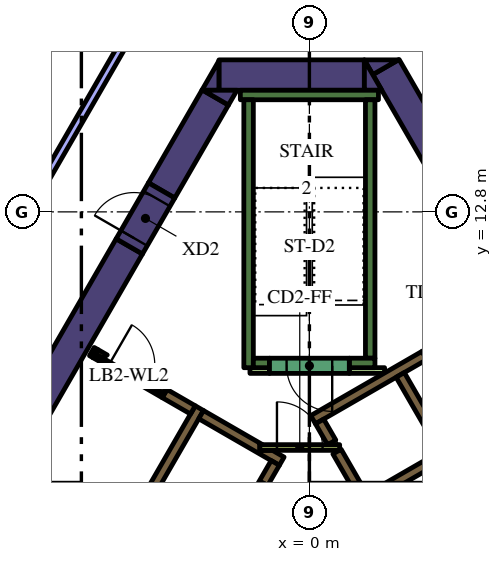
"""IFC4 building model, lengths in metres.
Left out: names, types, materials, properties, quantities, classifications, styles, units other than length and angle.
Written with IfcOpenShell. Run it as: python <this file> out.ifc"""

import sys

from ifc_helpers import new_model, si_unit, direction, frame, frame_2d, origin, place, context, subcontext, project, spatial, polyline, rectangle, outline, extrude, element, fill, save


model = new_model("IFC4")
c1 = context("Model", 3, precision=1e-05, world=origin(), true_north=direction((0.0, 1.0)))
c2 = subcontext(c1, "Body", "Model", "MODEL_VIEW")
j1 = project(units=[si_unit("LENGTHUNIT", "METRE"), si_unit("PLANEANGLEUNIT", "RADIAN")], contexts=[c1])
p1 = place(None, origin())
s1 = spatial("IfcSite", under=j1, at=p1, CompositionType="ELEMENT")
p2 = place(p1, origin())
s2 = spatial("IfcBuilding", under=s1, at=p2, CompositionType="ELEMENT")
p3 = place(p2, frame((0.0, 0.0, 145.8)))
s3 = spatial("IfcBuildingStorey", under=s2, at=p3, CompositionType="ELEMENT", Elevation=145.8)
p4 = place(p3, frame((5.209, 11.078, 0.0), z_axis=(0.0, 0.0, 1.0), x_axis=(-0.500035624827, 0.866004834804, 0.0)))
e1 = element("IfcWall", 1, at=p4, inside=s3, PredefinedType="SOLIDWALL", context=c2, shape_type="SweptSolid", body=[
    extrude(rectangle(XDim=6.388, YDim=0.8, at=frame_2d((3.194, 0.0))), origin(), (0.0, 0.0, 1.0), 4.2),
])
p5 = place(p3, origin())
e2 = element("IfcWall", 2, at=p5, inside=s3, PredefinedType="SOLIDWALL", context=c2, shape_type="SweptSolid", body=[
    extrude(outline(polyline([(1.443, 16.8), (2.339, 16.8), (1.667, 16.412), (1.443, 16.8)])), origin(), (0.0, 0.0, 1.0), 4.2),
])
p6 = place(p3, frame((-2.379, 16.4, 0.0), z_axis=(0.0, 0.0, 1.0), x_axis=(1.0, 0.0, 0.0)))
e3 = element("IfcWall", 3, at=p6, inside=s3, PredefinedType="SOLIDWALL", context=c2, shape_type="SweptSolid", body=[
    extrude(rectangle(XDim=3.824, YDim=0.8, at=frame_2d((1.912, 0.0))), origin(), (0.0, 0.0, 1.0), 4.2),
])
e4 = element("IfcWall", 4, at=p5, inside=s3, PredefinedType="SOLIDWALL", context=c2, shape_type="SweptSolid", body=[
    extrude(outline(polyline([(1.905, 16.0), (1.447, 16.0), (1.447, 16.793), (1.905, 16.0)])), origin(), (0.0, 0.0, 1.0), 4.2),
])
e5 = element("IfcWall", 5, at=p5, inside=s3, PredefinedType="SOLIDWALL", context=c2, shape_type="SweptSolid", body=[
    extrude(outline(polyline([(-2.829, 16.0), (-2.381, 16.776), (-2.381, 16.0), (-2.829, 16.0)])), origin(), (0.0, 0.0, 1.0), 4.2),
])
p7 = place(p3, frame((-2.477, 15.81, 0.0), z_axis=(0.0, 0.0, 1.0), x_axis=(-0.499969377405, -0.866043083026, 0.0)))
e6 = element("IfcWall", 6, at=p7, inside=s3, PredefinedType="SOLIDWALL", context=c2, shape_type="SweptSolid", body=[
    extrude(rectangle(XDim=2.824, YDim=0.8, at=frame_2d((1.412, 0.0))), origin(), (0.0, 0.0, 1.0), 4.2),
])
e7 = element("IfcWall", 7, at=p5, inside=s3, PredefinedType="SOLIDWALL", context=c2, shape_type="SweptSolid", body=[
    extrude(outline(polyline([(-1.905, 16.0), (-2.129, 15.612), (-2.801, 16.0), (-1.905, 16.0)])), origin(), (0.0, 0.0, 1.0), 4.2),
])
p8 = place(p3, frame((-12.668, -1.842, 0.0), z_axis=(0.0, 0.0, 1.0), x_axis=(0.500003640647, 0.866023301845, 0.0)))
e8 = element("IfcWall", 8, at=p8, inside=s3, PredefinedType="SOLIDWALL", context=c2, shape_type="SweptSolid", body=[
    extrude(rectangle(XDim=15.858, YDim=0.8, at=frame_2d((7.929, 0.0))), origin(), (0.0, 0.0, 1.0), 4.2),
])
p9 = place(p3, frame((-1.817, 15.875, 0.0), z_axis=(0.0, 0.0, 1.0), x_axis=(1.0, 0.0, 0.0)))
e9 = element("IfcWall", 9, at=p9, inside=s3, PredefinedType="SOLIDWALL", context=c2, shape_type="SweptSolid", body=[
    extrude(rectangle(XDim=3.634, YDim=0.25, at=frame_2d((1.817, 0.0))), origin(), (0.0, 0.0, 1.0), 4.2),
])
p10 = place(p3, frame((1.6, 8.95, 0.0), z_axis=(0.0, 0.0, 1.0), x_axis=(0.0, 1.0, 0.0)))
e10 = element("IfcWall", 10, at=p10, inside=s3, PredefinedType="SOLIDWALL", context=c2, shape_type="SweptSolid", body=[
    extrude(rectangle(XDim=6.8, YDim=0.25, at=frame_2d((3.4, 0.0))), origin(), (0.0, 0.0, 1.0), 4.2),
])
p11 = place(p3, frame((1.05, 8.825, 0.0), z_axis=(0.0, 0.0, 1.0), x_axis=(1.0, 0.0, 0.0)))
e11 = element("IfcWall", 11, at=p11, inside=s3, PredefinedType="SOLIDWALL", context=c2, shape_type="SweptSolid", body=[
    extrude(rectangle(XDim=0.675, YDim=0.25, at=frame_2d((0.337, 0.0))), origin(), (0.0, 0.0, 1.0), 4.2),
])
p12 = place(p3, frame((-1.6, 8.7, 0.0), z_axis=(0.0, 0.0, 1.0), x_axis=(0.0, 1.0, 0.0)))
e12 = element("IfcWall", 12, at=p12, inside=s3, PredefinedType="SOLIDWALL", context=c2, shape_type="SweptSolid", body=[
    extrude(rectangle(XDim=7.05, YDim=0.25, at=frame_2d((3.525, 0.0))), origin(), (0.0, 0.0, 1.0), 4.2),
])
p13 = place(p3, frame((-1.475, 8.825, 0.0), z_axis=(0.0, 0.0, 1.0), x_axis=(1.0, 0.0, 0.0)))
e13 = element("IfcWall", 13, at=p13, inside=s3, PredefinedType="SOLIDWALL", context=c2, shape_type="SweptSolid", body=[
    extrude(rectangle(XDim=0.425, YDim=0.25, at=frame_2d((0.212, 0.0))), origin(), (0.0, 0.0, 1.0), 4.2),
])
p14 = place(p3, frame((3.028, 9.023, 0.0), z_axis=(0.0, 0.0, 1.0), x_axis=(-0.866036587186, -0.49998062928, 0.0)))
e14 = element("IfcWall", 14, at=p14, inside=s3, PredefinedType="SOLIDWALL", context=c2, shape_type="SweptSolid", body=[
    extrude(rectangle(XDim=3.384, YDim=0.25, at=frame_2d((1.692, 0.0))), origin(), (0.0, 0.0, 1.0), 4.2),
])
p15 = place(p3, frame((0.268, 7.285, 0.0), z_axis=(0.0, 0.0, 1.0), x_axis=(0.500098681536, -0.865968422476, 0.0)))
e15 = element("IfcWall", 15, at=p15, inside=s3, PredefinedType="SOLIDWALL", context=c2, shape_type="SweptSolid", body=[
    extrude(rectangle(XDim=0.636, YDim=0.25, at=frame_2d((0.318, 0.0))), origin(), (0.0, 0.0, 1.0), 4.2),
])
p16 = place(p3, frame((5.97, -2.591, 0.0), z_axis=(0.0, 0.0, 1.0), x_axis=(-0.499994469932, 0.866028596547, 0.0)))
e16 = element("IfcWall", 16, at=p16, inside=s3, PredefinedType="SOLIDWALL", context=c2, shape_type="SweptSolid", body=[
    extrude(rectangle(XDim=10.488, YDim=0.25, at=frame_2d((5.244, 0.0))), origin(), (0.0, 0.0, 1.0), 4.2),
])
p17 = place(p3, frame((1.574, 5.274, 0.0), z_axis=(0.0, 0.0, 1.0), x_axis=(0.866028486751, 0.499994660107, 0.0)))
e17 = element("IfcWall", 17, at=p17, inside=s3, PredefinedType="SOLIDWALL", context=c2, shape_type="SweptSolid", body=[
    extrude(rectangle(XDim=2.2, YDim=0.25, at=frame_2d((1.1, 0.0))), origin(), (0.0, 0.0, 1.0), 4.2),
])
p18 = place(p3, frame((-8.06, -1.311, 0.0), z_axis=(0.0, 0.0, 1.0), x_axis=(0.50000273126, 0.866023826885, 0.0)))
e18 = element("IfcWall", 18, at=p18, inside=s3, PredefinedType="SOLIDWALL", context=c2, shape_type="SweptSolid", body=[
    extrude(rectangle(XDim=10.33, YDim=0.25, at=frame_2d((5.165, 0.0))), origin(), (0.0, 0.0, 1.0), 4.2),
])
e19 = element("IfcWall", 19, at=p5, inside=s3, PredefinedType="SOLIDWALL", context=c2, shape_type="SweptSolid", body=[
    extrude(outline(polyline([(-2.912, 7.356), (-2.787, 7.573), (-1.232, 6.675), (-1.303, 6.675), (-1.304, 6.675), (-1.304, 6.675), (-1.304, 6.525), (-1.304, 6.525), (-1.303, 6.525), (-0.971, 6.525), (-0.665, 6.348), (-0.79, 6.132), (-1.007, 6.257), (-1.007, 6.257), (-2.912, 7.356)])), origin(), (0.0, 0.0, 1.0), 4.2),
])
p19 = place(p3, frame((-5.725, 9.125, 0.0), z_axis=(0.0, 0.0, 1.0), x_axis=(0.866185586049, -0.49972245349, 0.0)))
e20 = element("IfcWall", 20, at=p19, inside=s3, PredefinedType="SOLIDWALL", context=c2, shape_type="SweptSolid", body=[
    extrude(rectangle(XDim=0.11, YDim=0.25, at=frame_2d((0.055, 0.0))), origin(), (0.0, 0.0, 1.0), 4.2),
])
p20 = place(p3, frame((-3.066, 7.59, 0.0), z_axis=(0.0, 0.0, 1.0), x_axis=(-0.866081358704, 0.49990307071, 0.0)))
e21 = element("IfcWall", 21, at=p20, inside=s3, PredefinedType="SOLIDWALL", context=c2, shape_type="SweptSolid", body=[
    extrude(rectangle(XDim=0.858, YDim=0.25, at=frame_2d((0.429, 0.0))), origin(), (0.0, 0.0, 1.0), 4.2),
])
e22 = element("IfcWall", 22, at=p5, inside=s3, PredefinedType="SOLIDWALL", context=c2, shape_type="SweptSolid", body=[
    extrude(outline(polyline([(-3.748, 8.128), (-3.813, 8.015), (-4.027, 8.139), (-4.017, 8.156), (-4.008, 8.173), (-4.0, 8.192), (-3.995, 8.21), (-3.991, 8.23), (-3.99, 8.25), (-3.99, 8.268), (-3.748, 8.128)])), origin(), (0.0, 0.0, 1.0), 4.2),
])
e23 = element("IfcWall", 23, at=p5, inside=s3, PredefinedType="SOLIDWALL", context=c2, shape_type="SweptSolid", body=[
    extrude(outline(polyline([(-5.689, 8.96), (-5.69, 8.961), (-5.565, 9.177), (-5.319, 9.035), (-5.335, 9.026), (-5.351, 9.015), (-5.366, 9.002), (-5.379, 8.988), (-5.392, 8.972), (-5.402, 8.956), (-5.412, 8.939), (-5.629, 9.064), (-5.629, 9.064), (-5.689, 8.96)])), origin(), (0.0, 0.0, 1.0), 4.2),
])
p21 = place(p3, frame((1.05, 8.625, 0.0), z_axis=(0.0, 0.0, 1.0), x_axis=(1.0, 0.0, 0.0)))
e24 = element("IfcWall", 24, at=p21, inside=s3, PredefinedType="PARTITIONING", context=c2, shape_type="SweptSolid", body=[
    extrude(rectangle(XDim=0.929, YDim=0.15, at=frame_2d((0.464, 0.0))), origin(), (0.0, 0.0, 1.0), 3.15),
])
p22 = place(p3, frame((-1.564, 8.625, 0.0), z_axis=(0.0, 0.0, 1.0), x_axis=(1.0, 0.0, 0.0)))
e25 = element("IfcWall", 25, at=p22, inside=s3, PredefinedType="PARTITIONING", context=c2, shape_type="SweptSolid", body=[
    extrude(rectangle(XDim=0.514, YDim=0.15, at=frame_2d((0.257, 0.0))), origin(), (0.0, 0.0, 1.0), 3.15),
])
p23 = place(p3, frame((8.565, -2.185, 0.0), z_axis=(0.0, 0.0, 1.0), x_axis=(-0.499997954832, 0.866026584559, 0.0)))
e26 = element("IfcWall", 26, at=p23, inside=s3, PredefinedType="SOLIDWALL", context=c2, shape_type="SweptSolid", body=[
    extrude(rectangle(XDim=12.35, YDim=0.25, at=frame_2d((6.175, 0.0))), origin(), (0.0, 0.0, 1.0), 4.2),
])
p24 = place(p23, frame((0.585, 0.0, 0.0)))
e27 = element("IfcOpeningElement", 27, at=p24, cuts=e26, PredefinedType="OPENING", context=c2, shape_type="SweptSolid", body=[
    extrude(rectangle(XDim=1.1, YDim=2.1, at=frame_2d((0.55, 1.05))), frame((0.0, 0.135, 0.0), z_axis=(0.0, -1.0, 0.0), x_axis=(1.0, 0.0, 0.0)), (0.0, 0.0, 1.0), 0.27),
])
p25 = place(p3, frame((-0.898, 6.194, 0.0), z_axis=(0.0, 0.0, 1.0), x_axis=(-0.499996202215, -0.866027596426, 0.0)))
e28 = element("IfcWall", 28, at=p25, inside=s3, PredefinedType="SOLIDWALL", context=c2, shape_type="SweptSolid", body=[
    extrude(rectangle(XDim=9.83, YDim=0.25, at=frame_2d((4.915, 0.0))), origin(), (0.0, 0.0, 1.0), 4.2),
])
p26 = place(p25, frame((0.585, 0.0, 0.0)))
e29 = element("IfcOpeningElement", 29, at=p26, cuts=e28, PredefinedType="OPENING", context=c2, shape_type="SweptSolid", body=[
    extrude(rectangle(XDim=1.1, YDim=2.1, at=frame_2d((0.55, 1.05))), frame((0.0, 0.135, 0.0), z_axis=(0.0, -1.0, 0.0), x_axis=(1.0, 0.0, 0.0)), (0.0, 0.0, 1.0), 0.27),
])
p27 = place(p25, frame((3.105, 0.0, 0.0)))
e30 = element("IfcOpeningElement", 30, at=p27, cuts=e28, PredefinedType="OPENING", context=c2, shape_type="SweptSolid", body=[
    extrude(rectangle(XDim=1.1, YDim=2.1, at=frame_2d((0.55, 1.05))), frame((0.0, 0.135, 0.0), z_axis=(0.0, -1.0, 0.0), x_axis=(1.0, 0.0, 0.0)), (0.0, 0.0, 1.0), 0.27),
])
p28 = place(p25, frame((5.625, 0.0, 0.0)))
e31 = element("IfcOpeningElement", 31, at=p28, cuts=e28, PredefinedType="OPENING", context=c2, shape_type="SweptSolid", body=[
    extrude(rectangle(XDim=1.1, YDim=2.1, at=frame_2d((0.55, 1.05))), frame((0.0, 0.135, 0.0), z_axis=(0.0, -1.0, 0.0), x_axis=(1.0, 0.0, 0.0)), (0.0, 0.0, 1.0), 0.27),
])
p29 = place(p25, frame((8.145, 0.0, 0.0)))
e32 = element("IfcOpeningElement", 32, at=p29, cuts=e28, PredefinedType="OPENING", context=c2, shape_type="SweptSolid", body=[
    extrude(rectangle(XDim=1.1, YDim=2.1, at=frame_2d((0.55, 1.05))), frame((0.0, 0.135, 0.0), z_axis=(0.0, -1.0, 0.0), x_axis=(1.0, 0.0, 0.0)), (0.0, 0.0, 1.0), 0.27),
])
p30 = place(p3, frame((1.05, 8.75, 0.0), z_axis=(0.0, 0.0, 1.0), x_axis=(-1.0, 0.0, 0.0)))
e33 = element("IfcWall", 33, at=p30, inside=s3, PredefinedType="SOLIDWALL", context=c2, shape_type="SweptSolid", body=[
    extrude(rectangle(XDim=2.1, YDim=0.4, at=frame_2d((1.05, 0.0))), origin(), (0.0, 0.0, 1.0), 4.2),
])
p31 = place(p30, frame((0.45, 0.0, 0.0)))
e34 = element("IfcOpeningElement", 34, at=p31, cuts=e33, PredefinedType="OPENING", context=c2, shape_type="SweptSolid", body=[
    extrude(rectangle(XDim=1.2, YDim=2.1, at=frame_2d((0.6, 1.05))), frame((0.0, 0.21, 0.0), z_axis=(0.0, -1.0, 0.0), x_axis=(1.0, 0.0, 0.0)), (0.0, 0.0, 1.0), 0.42),
])
p32 = place(p3, frame((-1.303, 6.6, 0.0), z_axis=(0.0, 0.0, 1.0), x_axis=(1.0, 0.0, 0.0)))
e35 = element("IfcWall", 35, at=p32, inside=s3, PredefinedType="PARTITIONING", context=c2, shape_type="SweptSolid", body=[
    extrude(rectangle(XDim=2.1, YDim=0.15, at=frame_2d((1.05, 0.0))), origin(), (0.0, 0.0, 1.0), 4.2),
])
p33 = place(p32, frame((0.45, 0.0, 0.0)))
e36 = element("IfcOpeningElement", 36, at=p33, cuts=e35, PredefinedType="OPENING", context=c2, shape_type="SweptSolid", body=[
    extrude(rectangle(XDim=1.2, YDim=2.1, at=frame_2d((0.6, 1.05))), frame((0.0, 0.085, 0.0), z_axis=(0.0, -1.0, 0.0), x_axis=(1.0, 0.0, 0.0)), (0.0, 0.0, 1.0), 0.17),
])
p34 = place(p3, frame((-5.659, 9.012, 0.0), z_axis=(0.0, 0.0, 1.0), x_axis=(0.866009402589, -0.500027713859, 0.0)))
e37 = element("IfcWall", 37, at=p34, inside=s3, PredefinedType="PARTITIONING", context=c2, shape_type="SweptSolid", body=[
    extrude(rectangle(XDim=2.1, YDim=0.12, at=frame_2d((1.05, 0.0))), origin(), (0.0, 0.0, 1.0), 3.15),
])
p35 = place(p34, frame((0.45, 0.0, 0.0)))
e38 = element("IfcOpeningElement", 38, at=p35, cuts=e37, PredefinedType="OPENING", context=c2, shape_type="SweptSolid", body=[
    extrude(rectangle(XDim=1.2, YDim=2.1, at=frame_2d((0.6, 1.05))), frame((0.0, 0.07, 0.0), z_axis=(0.0, -1.0, 0.0), x_axis=(1.0, 0.0, 0.0)), (0.0, 0.0, 1.0), 0.14),
])
p36 = place(p3, frame((-4.739, 11.892, 0.0), z_axis=(0.0, 0.0, 1.0), x_axis=(0.500062241894, 0.865989465428, 0.0)))
e39 = element("IfcWall", 39, at=p36, inside=s3, PredefinedType="SOLIDWALL", context=c2, shape_type="SweptSolid", body=[
    extrude(rectangle(XDim=1.7, YDim=0.8, at=frame_2d((0.85, 0.0))), origin(), (0.0, 0.0, 1.0), 4.2),
])
p37 = place(p36, frame((0.25, 0.0, 0.0)))
e40 = element("IfcOpeningElement", 40, at=p37, cuts=e39, PredefinedType="OPENING", context=c2, shape_type="SweptSolid", body=[
    extrude(rectangle(XDim=1.2, YDim=2.1, at=frame_2d((0.6, 1.05))), frame((0.0, 0.41, 0.0), z_axis=(0.0, -1.0, 0.0), x_axis=(1.0, 0.0, 0.0)), (0.0, 0.0, 1.0), 0.82),
])
p38 = place(p3, frame((-6.658, 20.96, 0.0), z_axis=(0.0, 0.0, 1.0), x_axis=(-0.551907039463, -0.833905642019, 0.0)))
e41 = element("IfcWall", 41, at=p38, inside=s3, PredefinedType="PARTITIONING", context=c2, shape_type="SweptSolid", body=[
    extrude(rectangle(XDim=5.412, YDim=0.15, at=frame_2d((2.706, 0.0))), origin(), (0.0, 0.0, 1.0), 3.15),
])
p39 = place(p3, frame((-4.167, 18.483, 0.0), z_axis=(0.0, 0.0, 1.0), x_axis=(-0.499974340325, -0.866040217898, 0.0)))
e42 = element("IfcWall", 42, at=p39, inside=s3, PredefinedType="PARTITIONING", context=c2, shape_type="SweptSolid", body=[
    extrude(rectangle(XDim=8.894, YDim=0.2, at=frame_2d((4.447, 0.0))), origin(), (0.0, 0.0, 1.0), 3.15),
])
p40 = place(p26, origin())
e43 = element("IfcDoor", 43, at=p40, inside=s3, OperationType="DOUBLE_DOOR_SLIDING", PredefinedType="DOOR", context=c2, shape_type="SweptSolid", body=[
    extrude(rectangle(XDim=1.1, YDim=2.1, at=frame_2d((0.55, 1.05))), frame((0.0, 0.025, 0.0), z_axis=(0.0, -1.0, 0.0), x_axis=(1.0, 0.0, 0.0)), (0.0, 0.0, 1.0), 0.05),
])
fill(e29, e43)
p41 = place(p31, origin())
e44 = element("IfcDoor", 44, at=p41, inside=s3, OperationType="SINGLE_SWING_LEFT", PredefinedType="DOOR", context=c2, shape_type="SweptSolid", body=[
    extrude(rectangle(XDim=1.2, YDim=2.1, at=frame_2d((0.6, 1.05))), frame((0.0, 0.025, 0.0), z_axis=(0.0, -1.0, 0.0), x_axis=(1.0, 0.0, 0.0)), (0.0, 0.0, 1.0), 0.05),
])
fill(e34, e44)
p42 = place(p33, origin())
e45 = element("IfcDoor", 45, at=p42, inside=s3, OperationType="SINGLE_SWING_LEFT", PredefinedType="DOOR", context=c2, shape_type="SweptSolid", body=[
    extrude(rectangle(XDim=1.2, YDim=2.1, at=frame_2d((0.6, 1.05))), frame((0.0, 0.025, 0.0), z_axis=(0.0, -1.0, 0.0), x_axis=(1.0, 0.0, 0.0)), (0.0, 0.0, 1.0), 0.05),
])
fill(e36, e45)
p43 = place(p35, origin())
e46 = element("IfcDoor", 46, at=p43, inside=s3, OperationType="SINGLE_SWING_LEFT", PredefinedType="DOOR", context=c2, shape_type="SweptSolid", body=[
    extrude(rectangle(XDim=1.2, YDim=2.1, at=frame_2d((0.6, 1.05))), frame((0.0, 0.025, 0.0), z_axis=(0.0, -1.0, 0.0), x_axis=(1.0, 0.0, 0.0)), (0.0, 0.0, 1.0), 0.05),
])
fill(e38, e46)
p44 = place(p37, origin())
e47 = element("IfcDoor", 47, at=p44, inside=s3, OperationType="SINGLE_SWING_LEFT", PredefinedType="DOOR", context=c2, shape_type="SweptSolid", body=[
    extrude(rectangle(XDim=1.2, YDim=2.1, at=frame_2d((0.6, 1.05))), frame((0.0, 0.025, 0.0), z_axis=(0.0, -1.0, 0.0), x_axis=(1.0, 0.0, 0.0)), (0.0, 0.0, 1.0), 0.05),
])
fill(e40, e47)
save(model, sys.argv[1])
